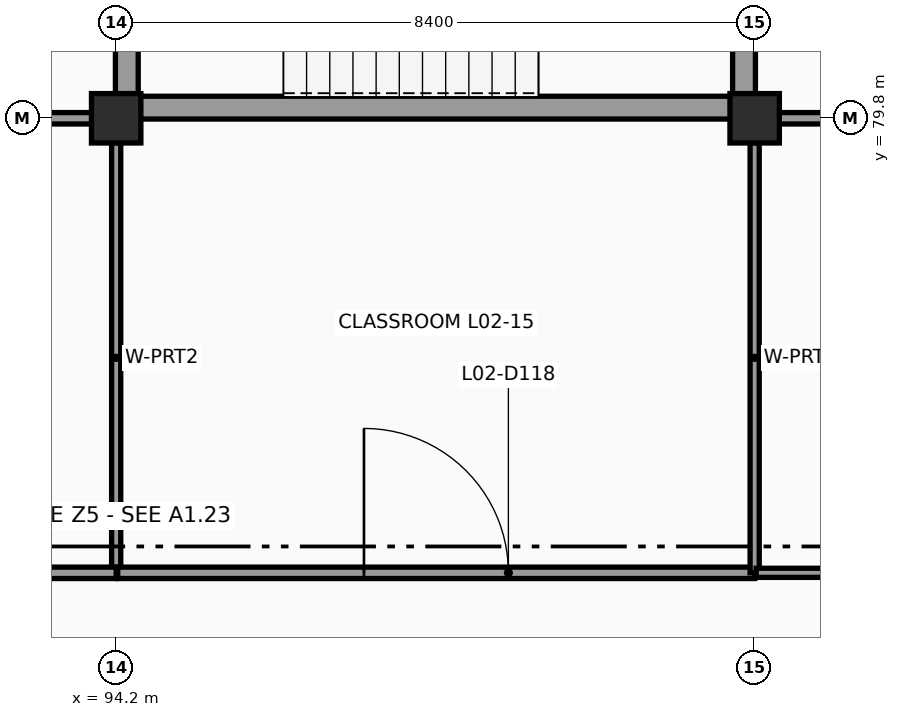
"""IFC4 building model, lengths in metres.
Left out: names, types, materials, properties, quantities, classifications, styles, units other than length and angle.
Written with IfcOpenShell. Run it as: python <this file> out.ifc"""

import sys

from ifc_helpers import new_model, si_unit, direction, frame, frame_2d, origin, origin_2d, place, context, subcontext, project, spatial, rectangle, extrude, element, fill, save


model = new_model("IFC4")
c1 = context("Model", 3, precision=1e-05, world=origin(), true_north=direction((0.0, 1.0)))
c2 = subcontext(c1, "Body", "Model", "MODEL_VIEW")
j1 = project(units=[si_unit("LENGTHUNIT", "METRE"), si_unit("PLANEANGLEUNIT", "RADIAN")], contexts=[c1])
p1 = place(None, origin())
s1 = spatial("IfcSite", under=j1, at=p1, CompositionType="ELEMENT")
p2 = place(p1, origin())
s2 = spatial("IfcBuilding", under=s1, at=p2, CompositionType="ELEMENT")
p3 = place(p2, frame((0.0, 0.0, 7.8)))
s3 = spatial("IfcBuildingStorey", under=s2, at=p3, CompositionType="ELEMENT", Elevation=7.8)
for number, where, z_axis, x_axis in (
    (1, (94.2, 79.8, 0.0), (0.0, 0.0, 1.0), (1.0, 0.0, 0.0)),
    (2, (102.6, 79.8, 0.0), (0.0, 0.0, 1.0), (1.0, 0.0, 0.0)),
):
    element("IfcColumn", number, at=place(p3, frame(where, z_axis=z_axis, x_axis=x_axis)), inside=s3, PredefinedType="COLUMN", context=c2, shape_type="SweptSolid", body=[
        extrude(rectangle(XDim=0.65, YDim=0.65, at=origin_2d()), origin(), (0.0, 0.0, 1.0), 3.6),
    ])
p4 = place(p3, frame((94.34, 79.94, 0.0), z_axis=(0.0, 0.0, 1.0), x_axis=(1.0, 0.0, 0.0)))
e3 = element("IfcWall", 3, at=p4, inside=s3, PredefinedType="SHEAR", context=c2, shape_type="SweptSolid", body=[
    extrude(rectangle(XDim=8.12, YDim=0.3, at=frame_2d((4.06, 0.0))), origin(), (0.0, 0.0, 1.0), 3.6),
])
for number, where, z_axis, x_axis in (
    (4, (102.46, 79.94, 0.0), (0.0, 0.0, 1.0), (0.0, 1.0, 0.0)),
    (5, (94.34, 84.22, 0.0), (0.0, 0.0, 1.0), (0.0, -1.0, 0.0)),
):
    element("IfcWall", number, at=place(p3, frame(where, z_axis=z_axis, x_axis=x_axis)), inside=s3, PredefinedType="SHEAR", context=c2, shape_type="SweptSolid", body=[
        extrude(rectangle(XDim=4.28, YDim=0.3, at=frame_2d((2.14, 0.0))), origin(), (0.0, 0.0, 1.0), 3.6),
    ])
p5 = place(p3, frame((106.8, 79.8, 0.0), z_axis=(0.0, 0.0, 1.0), x_axis=(-1.0, 0.0, 0.0)))
e6 = element("IfcWall", 6, at=p5, inside=s3, PredefinedType="PARTITIONING", context=c2, shape_type="SweptSolid", body=[
    extrude(rectangle(XDim=3.877, YDim=0.15, at=frame_2d((1.938, 0.0))), origin(), (0.0, 0.0, 1.0), 2.95),
])
p6 = place(p3, frame((86.123, 79.8, 0.0), z_axis=(0.0, 0.0, 1.0), x_axis=(1.0, 0.0, 0.0)))
e7 = element("IfcWall", 7, at=p6, inside=s3, PredefinedType="PARTITIONING", context=c2, shape_type="SweptSolid", body=[
    extrude(rectangle(XDim=7.754, YDim=0.15, at=frame_2d((3.877, 0.0))), origin(), (0.0, 0.0, 1.0), 2.95),
])
p7 = place(p3, frame((94.2, 79.477, 0.0), z_axis=(0.0, 0.0, 1.0), x_axis=(0.0, -1.0, 0.0)))
e8 = element("IfcWall", 8, at=p7, inside=s3, PredefinedType="PARTITIONING", context=c2, shape_type="SweptSolid", body=[
    extrude(rectangle(XDim=5.657, YDim=0.12, at=frame_2d((2.829, 0.0))), origin(), (0.0, 0.0, 1.0), 2.69),
])
p8 = place(p3, frame((94.2, 73.82, 0.0), z_axis=(0.0, 0.0, 1.0), x_axis=(-1.0, 0.0, 0.0)))
e9 = element("IfcWall", 9, at=p8, inside=s3, PredefinedType="PARTITIONING", context=c2, shape_type="SweptSolid", body=[
    extrude(rectangle(XDim=8.4, YDim=0.15, at=frame_2d((4.2, 0.0))), origin(), (0.0, 0.0, 1.0), 2.69),
])
p9 = place(p3, frame((102.6, 73.82, 0.0), z_axis=(0.0, 0.0, 1.0), x_axis=(-1.0, 0.0, 0.0)))
e10 = element("IfcWall", 10, at=p9, inside=s3, PredefinedType="PARTITIONING", context=c2, shape_type="SweptSolid", body=[
    extrude(rectangle(XDim=8.38, YDim=0.15, at=frame_2d((4.19, 0.0))), origin(), (0.0, 0.0, 1.0), 2.69),
])
p10 = place(p9, frame((3.24, 0.0, 0.0)))
e11 = element("IfcOpeningElement", 11, at=p10, cuts=e10, PredefinedType="OPENING", context=c2, shape_type="SweptSolid", body=[
    extrude(rectangle(XDim=1.9, YDim=2.3, at=frame_2d((0.95, 1.15))), frame((0.0, 0.085, 0.0), z_axis=(0.0, -1.0, 0.0), x_axis=(1.0, 0.0, 0.0)), (0.0, 0.0, 1.0), 0.17),
])
p11 = place(p3, frame((102.6, 79.477, 0.0), z_axis=(0.0, 0.0, 1.0), x_axis=(0.0, -1.0, 0.0)))
e12 = element("IfcWall", 12, at=p11, inside=s3, PredefinedType="PARTITIONING", context=c2, shape_type="SweptSolid", body=[
    extrude(rectangle(XDim=5.657, YDim=0.12, at=frame_2d((2.829, 0.0))), origin(), (0.0, 0.0, 1.0), 2.74),
])
p12 = place(p3, frame((110.577, 73.82, 0.0), z_axis=(0.0, 0.0, 1.0), x_axis=(-1.0, 0.0, 0.0)))
e13 = element("IfcWall", 13, at=p12, inside=s3, PredefinedType="PARTITIONING", context=c2, shape_type="SweptSolid", body=[
    extrude(rectangle(XDim=7.957, YDim=0.12, at=frame_2d((3.979, 0.0))), origin(), (0.0, 0.0, 1.0), 2.74),
])
p13 = place(p10, origin())
e14 = element("IfcDoor", 14, at=p13, inside=s3, OperationType="DOUBLE_DOOR_SINGLE_SWING", PredefinedType="DOOR", context=c2, shape_type="SweptSolid", body=[
    extrude(rectangle(XDim=1.9, YDim=2.3, at=frame_2d((0.95, 1.15))), frame((0.0, 0.025, 0.0), z_axis=(0.0, -1.0, 0.0), x_axis=(1.0, 0.0, 0.0)), (0.0, 0.0, 1.0), 0.05),
])
fill(e11, e14)
save(model, sys.argv[1])
